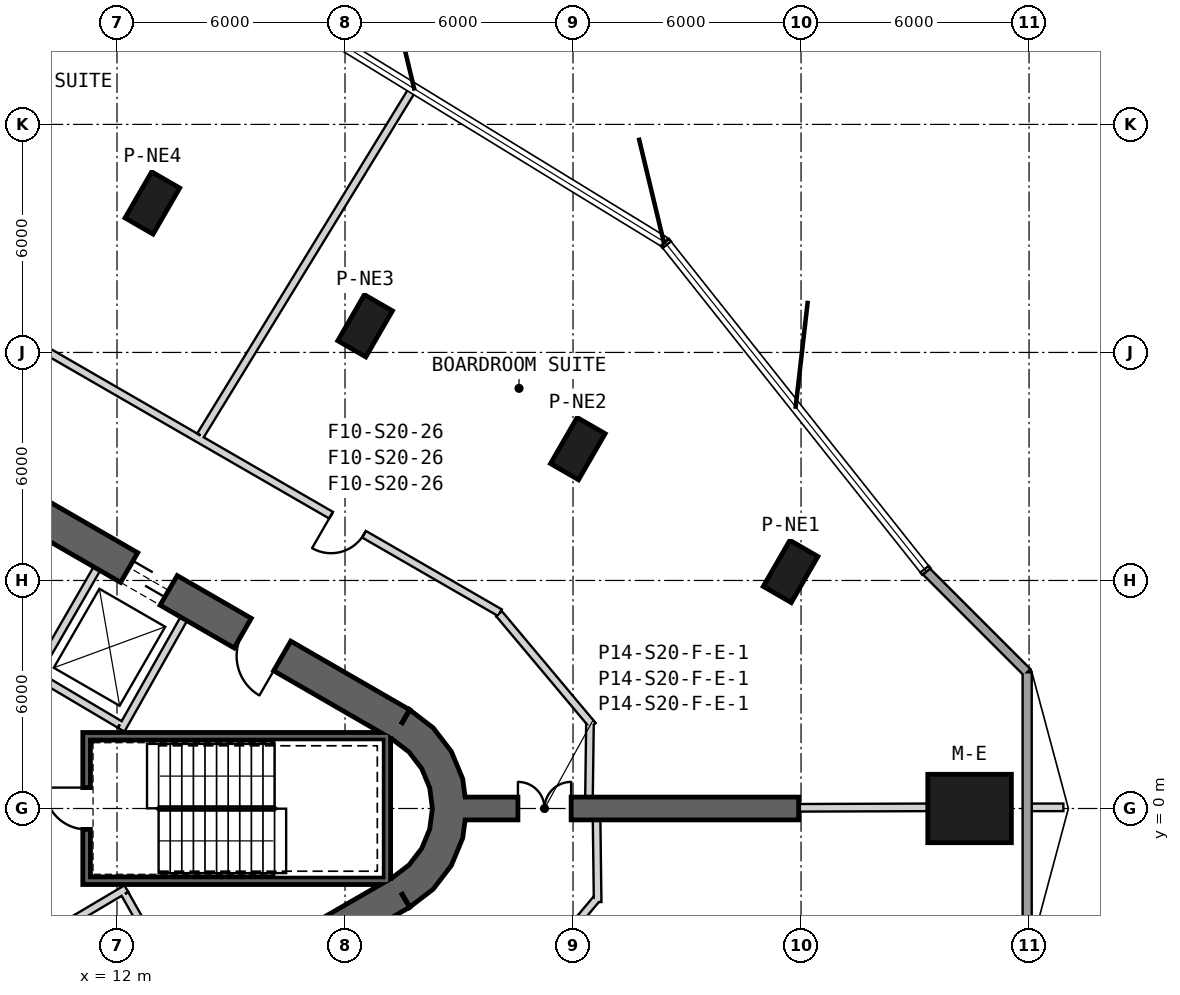
"""IFC4 building model, lengths in metres.
Left out: names, types, materials, properties, quantities, classifications, styles, units other than length and angle.
Written with IfcOpenShell. Run it as: python <this file> out.ifc"""

import sys

from ifc_helpers import new_model, si_unit, direction, frame, frame_2d, origin, origin_2d, place, context, subcontext, project, spatial, polyline, rectangle, outline, extrude, element, fill, save


model = new_model("IFC4")
c1 = context("Model", 3, precision=1e-05, world=origin(), true_north=direction((0.0, 1.0)))
c2 = subcontext(c1, "Body", "Model", "MODEL_VIEW")
j1 = project(units=[si_unit("LENGTHUNIT", "METRE"), si_unit("PLANEANGLEUNIT", "RADIAN")], contexts=[c1])
p1 = place(None, origin())
s1 = spatial("IfcSite", under=j1, at=p1, CompositionType="ELEMENT")
p2 = place(p1, origin())
s2 = spatial("IfcBuilding", under=s1, at=p2, CompositionType="ELEMENT")
p3 = place(p2, frame((0.0, 0.0, 322.1)))
s3 = spatial("IfcBuildingStorey", under=s2, at=p3, CompositionType="ELEMENT", Elevation=322.1)
p4 = place(p3, frame((34.435, 0.0, 0.0), z_axis=(0.0, 0.0, 1.0), x_axis=(1.0, 0.0, 0.0)))
e1 = element("IfcColumn", 1, at=p4, inside=s3, PredefinedType="COLUMN", context=c2, shape_type="SweptSolid", body=[
    extrude(rectangle(XDim=2.2, YDim=1.8, at=origin_2d()), origin(), (0.0, 0.0, 1.0), 3.9),
])
for number, where, z_axis, x_axis in (
    (2, (29.725, 6.237, 0.0), (0.0, 0.0, 1.0), (0.5, 0.866, 0.0)),
    (3, (24.127, 9.469, 0.0), (0.0, 0.0, 1.0), (0.5, 0.866, 0.0)),
    (4, (18.529, 12.701, 0.0), (0.0, 0.0, 1.0), (0.5, 0.866, 0.0)),
    (5, (12.931, 15.933, 0.0), (0.0, 0.0, 1.0), (0.5, 0.866, 0.0)),
):
    element("IfcColumn", number, at=place(p3, frame(where, z_axis=z_axis, x_axis=x_axis)), inside=s3, PredefinedType="COLUMN", context=c2, shape_type="SweptSolid", body=[
        extrude(rectangle(XDim=1.4, YDim=0.85, at=origin_2d()), origin(), (0.0, 0.0, 1.0), 3.9),
    ])
p5 = place(p3, frame((19.475, 2.208, 0.0), z_axis=(0.0, 0.0, 1.0), x_axis=(-0.866028369851, 0.499994862586, 0.0)))
e6 = element("IfcWall", 6, at=p5, inside=s3, PredefinedType="SHEAR", context=c2, shape_type="SweptSolid", body=[
    extrude(rectangle(XDim=31.523, YDim=0.9, at=frame_2d((15.762, 0.0))), origin(), (0.0, 0.0, 1.0), 3.9),
])
p6 = place(p5, frame((7.062, 0.0, 0.0)))
e7 = element("IfcOpeningElement", 7, at=p6, cuts=e6, PredefinedType="OPENING", context=c2, shape_type="SweptSolid", body=[
    extrude(rectangle(XDim=1.2, YDim=2.4, at=frame_2d((0.6, 1.2))), frame((0.0, 0.46, 0.0), z_axis=(0.0, -1.0, 0.0), x_axis=(1.0, 0.0, 0.0)), (0.0, 0.0, 1.0), 0.92),
])
p7 = place(p5, frame((3.612, 0.0, 0.0)))
e8 = element("IfcOpeningElement", 8, at=p7, cuts=e6, PredefinedType="OPENING", context=c2, shape_type="SweptSolid", body=[
    extrude(rectangle(XDim=1.2, YDim=2.4, at=frame_2d((0.6, 1.2))), frame((0.0, 0.46, 0.0), z_axis=(0.0, -1.0, 0.0), x_axis=(1.0, 0.0, 0.0)), (0.0, 0.0, 1.0), 0.92),
])
p8 = place(p5, frame((26.712, 0.0, 0.0)))
e9 = element("IfcOpeningElement", 9, at=p8, cuts=e6, PredefinedType="OPENING", context=c2, shape_type="SweptSolid", body=[
    extrude(rectangle(XDim=1.2, YDim=2.4, at=frame_2d((0.6, 1.2))), frame((0.0, 0.46, 0.0), z_axis=(0.0, -1.0, 0.0), x_axis=(1.0, 0.0, 0.0)), (0.0, 0.0, 1.0), 0.92),
])
p9 = place(p3, frame((-7.825, -17.97, 0.0), z_axis=(0.0, 0.0, 1.0), x_axis=(0.866028369851, 0.499994862586, 0.0)))
e10 = element("IfcWall", 10, at=p9, inside=s3, PredefinedType="SHEAR", context=c2, shape_type="SweptSolid", body=[
    extrude(rectangle(XDim=31.523, YDim=0.9, at=frame_2d((15.762, 0.0))), origin(), (0.0, 0.0, 1.0), 3.9),
])
p10 = place(p9, frame((17.862, 0.0, 0.0)))
e11 = element("IfcOpeningElement", 11, at=p10, cuts=e10, PredefinedType="OPENING", context=c2, shape_type="SweptSolid", body=[
    extrude(rectangle(XDim=1.2, YDim=2.4, at=frame_2d((0.6, 1.2))), frame((0.0, 0.46, 0.0), z_axis=(0.0, -1.0, 0.0), x_axis=(1.0, 0.0, 0.0)), (0.0, 0.0, 1.0), 0.92),
])
p11 = place(p9, frame((20.562, 0.0, 0.0)))
e12 = element("IfcOpeningElement", 12, at=p11, cuts=e10, PredefinedType="OPENING", context=c2, shape_type="SweptSolid", body=[
    extrude(rectangle(XDim=1.2, YDim=2.4, at=frame_2d((0.6, 1.2))), frame((0.0, 0.46, 0.0), z_axis=(0.0, -1.0, 0.0), x_axis=(1.0, 0.0, 0.0)), (0.0, 0.0, 1.0), 0.92),
])
p12 = place(p9, frame((26.712, 0.0, 0.0)))
e13 = element("IfcOpeningElement", 13, at=p12, cuts=e10, PredefinedType="OPENING", context=c2, shape_type="SweptSolid", body=[
    extrude(rectangle(XDim=1.2, YDim=2.4, at=frame_2d((0.6, 1.2))), frame((0.0, 0.46, 0.0), z_axis=(0.0, -1.0, 0.0), x_axis=(1.0, 0.0, 0.0)), (0.0, 0.0, 1.0), 0.92),
])
p13 = place(p9, frame((3.612, 0.0, 0.0)))
e14 = element("IfcOpeningElement", 14, at=p13, cuts=e10, PredefinedType="OPENING", context=c2, shape_type="SweptSolid", body=[
    extrude(rectangle(XDim=1.2, YDim=2.4, at=frame_2d((0.6, 1.2))), frame((0.0, 0.46, 0.0), z_axis=(0.0, -1.0, 0.0), x_axis=(1.0, 0.0, 0.0)), (0.0, 0.0, 1.0), 0.92),
])
p14 = place(p3, origin())
e15 = element("IfcWall", 15, at=p14, inside=s3, PredefinedType="SHEAR", context=c2, shape_type="SweptSolid", body=[
    extrude(outline(polyline([(19.7, -2.598), (20.321, -2.121), (20.798, -1.5), (21.098, -0.777), (21.2, 0.0), (21.098, 0.777), (20.798, 1.5), (20.321, 2.121), (19.7, 2.598), (19.25, 1.819), (19.685, 1.485), (20.019, 1.05), (20.229, 0.543), (20.3, 0.0), (20.229, -0.543), (20.019, -1.05), (19.685, -1.485), (19.25, -1.819), (19.7, -2.598)])), origin(), (0.0, 0.0, 1.0), 3.9),
])
p15 = place(p3, frame((21.15, 0.0, 0.0), z_axis=(0.0, 0.0, 1.0), x_axis=(1.0, 0.0, 0.0)))
e16 = element("IfcWall", 16, at=p15, inside=s3, PredefinedType="SHEAR", context=c2, shape_type="SweptSolid", body=[
    extrude(rectangle(XDim=8.787, YDim=0.6, at=frame_2d((4.394, 0.0))), origin(), (0.0, 0.0, 1.0), 3.9),
])
p16 = place(p15, frame((1.4, 0.0, 0.0)))
e17 = element("IfcOpeningElement", 17, at=p16, cuts=e16, PredefinedType="OPENING", context=c2, shape_type="SweptSolid", body=[
    extrude(rectangle(XDim=1.4, YDim=2.4, at=frame_2d((0.7, 1.2))), frame((0.0, 0.31, 0.0), z_axis=(0.0, -1.0, 0.0), x_axis=(1.0, 0.0, 0.0)), (0.0, 0.0, 1.0), 0.62),
])
p17 = place(p3, frame((35.95, -3.584, 0.0), z_axis=(0.0, 0.0, 1.0), x_axis=(0.0, 1.0, 0.0)))
e18 = element("IfcWall", 18, at=p17, inside=s3, PredefinedType="SOLIDWALL", context=c2, shape_type="SweptSolid", body=[
    extrude(rectangle(XDim=7.168, YDim=0.24, at=frame_2d((3.584, 0.0))), origin(), (0.0, 0.0, 1.0), 3.6),
])
p18 = place(p3, frame((35.95, 3.584, 0.0), z_axis=(0.0, 0.0, 1.0), x_axis=(-0.707074223377, 0.707139337497, 0.0)))
e19 = element("IfcWall", 19, at=p18, inside=s3, PredefinedType="SOLIDWALL", context=c2, shape_type="SweptSolid", body=[
    extrude(rectangle(XDim=3.75, YDim=0.24, at=frame_2d((1.875, 0.0))), origin(), (0.0, 0.0, 1.0), 3.6),
])
p19 = place(p3, frame((9.847, 3.495, 0.0), z_axis=(0.0, 0.0, 1.0), x_axis=(0.499984717929, 0.866034226713, 0.0)))
e20 = element("IfcWall", 20, at=p19, inside=s3, PredefinedType="PLUMBINGWALL", context=c2, shape_type="SweptSolid", body=[
    extrude(rectangle(XDim=3.25, YDim=0.2, at=frame_2d((1.625, 0.0))), origin(), (0.0, 0.0, 1.0), 3.6),
])
p20 = place(p3, frame((12.11, 2.073, 0.0), z_axis=(0.0, 0.0, 1.0), x_axis=(0.49196600604, 0.870614408852, 0.0)))
e21 = element("IfcWall", 21, at=p20, inside=s3, PredefinedType="PLUMBINGWALL", context=c2, shape_type="SweptSolid", body=[
    extrude(rectangle(XDim=3.35, YDim=0.2, at=frame_2d((1.675, 0.0))), origin(), (0.0, 0.0, 1.0), 3.6),
])
p21 = place(p3, frame((12.073, 2.211, 0.0), z_axis=(0.0, 0.0, 1.0), x_axis=(-0.860414880418, 0.509594185166, 0.0)))
e22 = element("IfcWall", 22, at=p21, inside=s3, PredefinedType="PLUMBINGWALL", context=c2, shape_type="SweptSolid", body=[
    extrude(rectangle(XDim=2.7, YDim=0.2, at=frame_2d((1.35, 0.0))), origin(), (0.0, 0.0, 1.0), 3.6),
])
p22 = place(p3, frame((19.2, 1.9, -0.3), z_axis=(0.0, 0.0, 1.0), x_axis=(-1.0, 0.0, 0.0)))
e23 = element("IfcWall", 23, at=p22, inside=s3, PredefinedType="SHEAR", context=c2, shape_type="SweptSolid", body=[
    extrude(rectangle(XDim=8.1, YDim=0.2, at=frame_2d((4.05, 0.0))), origin(), (0.0, 0.0, 1.0), 3.9),
])
p23 = place(p3, frame((19.1, -2.0, -0.3), z_axis=(0.0, 0.0, 1.0), x_axis=(0.0, 1.0, 0.0)))
e24 = element("IfcWall", 24, at=p23, inside=s3, PredefinedType="SHEAR", context=c2, shape_type="SweptSolid", body=[
    extrude(rectangle(XDim=3.8, YDim=0.2, at=frame_2d((1.9, 0.0))), origin(), (0.0, 0.0, 1.0), 3.9),
])
p24 = place(p3, frame((11.1, -1.9, -0.3), z_axis=(0.0, 0.0, 1.0), x_axis=(1.0, 0.0, 0.0)))
e25 = element("IfcWall", 25, at=p24, inside=s3, PredefinedType="SHEAR", context=c2, shape_type="SweptSolid", body=[
    extrude(rectangle(XDim=7.9, YDim=0.2, at=frame_2d((3.95, 0.0))), origin(), (0.0, 0.0, 1.0), 3.9),
])
p25 = place(p3, frame((11.2, -1.8, -0.3), z_axis=(0.0, 0.0, 1.0), x_axis=(0.0, 1.0, 0.0)))
e26 = element("IfcWall", 26, at=p25, inside=s3, PredefinedType="SHEAR", context=c2, shape_type="SweptSolid", body=[
    extrude(rectangle(XDim=3.6, YDim=0.2, at=frame_2d((1.8, 0.0))), origin(), (0.0, 0.0, 1.0), 3.9),
])
p26 = place(p25, frame((1.25, 0.0, 0.3)))
e27 = element("IfcOpeningElement", 27, at=p26, cuts=e26, PredefinedType="OPENING", context=c2, shape_type="SweptSolid", body=[
    extrude(rectangle(XDim=1.1, YDim=2.1, at=frame_2d((0.55, 1.05))), frame((0.0, 0.11, 0.0), z_axis=(0.0, -1.0, 0.0), x_axis=(1.0, 0.0, 0.0)), (0.0, 0.0, 1.0), 0.22),
])
p27 = place(p3, frame((12.245, -2.109, 0.0), z_axis=(0.0, 0.0, 1.0), x_axis=(-0.860414880418, -0.509594185166, 0.0)))
e28 = element("IfcWall", 28, at=p27, inside=s3, PredefinedType="PARTITIONING", context=c2, shape_type="SweptSolid", body=[
    extrude(rectangle(XDim=2.7, YDim=0.2, at=frame_2d((1.35, 0.0))), origin(), (0.0, 0.0, 1.0), 3.6),
])
p28 = place(p3, frame((13.758, -4.99, 0.0), z_axis=(0.0, 0.0, 1.0), x_axis=(-0.491993409184, 0.87059892334, 0.0)))
e29 = element("IfcWall", 29, at=p28, inside=s3, PredefinedType="PARTITIONING", context=c2, shape_type="SweptSolid", body=[
    extrude(rectangle(XDim=3.15, YDim=0.2, at=frame_2d((1.575, 0.0))), origin(), (0.0, 0.0, 1.0), 3.6),
])
p29 = place(p28, frame((1.175, 0.0, 0.0)))
e30 = element("IfcOpeningElement", 30, at=p29, cuts=e29, PredefinedType="OPENING", context=c2, shape_type="SweptSolid", body=[
    extrude(rectangle(XDim=0.8, YDim=2.1, at=frame_2d((0.4, 1.05))), frame((0.0, 0.11, 0.0), z_axis=(0.0, -1.0, 0.0), x_axis=(1.0, 0.0, 0.0)), (0.0, 0.0, 1.0), 0.22),
])
p30 = place(p3, frame((22.074, 5.153, 0.0), z_axis=(0.0, 0.0, 1.0), x_axis=(-0.866023485483, 0.500003322581, 0.0)))
e31 = element("IfcWall", 31, at=p30, inside=s3, PredefinedType="PARTITIONING", context=c2, shape_type="SweptSolid", body=[
    extrude(rectangle(XDim=32.881, YDim=0.2, at=frame_2d((16.44, 0.0))), origin(), (0.0, 0.0, 1.0), 2.97),
])
p31 = place(p30, frame((28.249, 0.0, 0.0)))
e32 = element("IfcOpeningElement", 32, at=p31, cuts=e31, PredefinedType="OPENING", context=c2, shape_type="SweptSolid", body=[
    extrude(rectangle(XDim=1.0, YDim=2.1, at=frame_2d((0.5, 1.05))), frame((0.0, 0.11, 0.0), z_axis=(0.0, -1.0, 0.0), x_axis=(1.0, 0.0, 0.0)), (0.0, 0.0, 1.0), 0.22),
])
p32 = place(p30, frame((16.387, 0.0, 0.0)))
e33 = element("IfcOpeningElement", 33, at=p32, cuts=e31, PredefinedType="OPENING", context=c2, shape_type="SweptSolid", body=[
    extrude(rectangle(XDim=1.0, YDim=2.1, at=frame_2d((0.5, 1.05))), frame((0.0, 0.11, 0.0), z_axis=(0.0, -1.0, 0.0), x_axis=(1.0, 0.0, 0.0)), (0.0, 0.0, 1.0), 0.22),
])
p33 = place(p30, frame((4.128, 0.0, 0.0)))
e34 = element("IfcOpeningElement", 34, at=p33, cuts=e31, PredefinedType="OPENING", context=c2, shape_type="SweptSolid", body=[
    extrude(rectangle(XDim=1.0, YDim=2.1, at=frame_2d((0.5, 1.05))), frame((0.0, 0.11, 0.0), z_axis=(0.0, -1.0, 0.0), x_axis=(1.0, 0.0, 0.0)), (0.0, 0.0, 1.0), 0.22),
])
p34 = place(p3, frame((24.521, 2.185, 0.0), z_axis=(0.0, 0.0, 1.0), x_axis=(-0.642781993054, 0.766049155998, 0.0)))
e35 = element("IfcWall", 35, at=p34, inside=s3, PredefinedType="PARTITIONING", context=c2, shape_type="SweptSolid", body=[
    extrude(rectangle(XDim=3.84, YDim=0.2, at=frame_2d((1.92, 0.0))), origin(), (0.0, 0.0, 1.0), 2.88),
])
p35 = place(p3, frame((24.42, 0.3, 0.0), z_axis=(0.0, 0.0, 1.0), x_axis=(0.013193472226, 0.999912962358, 0.0)))
e36 = element("IfcWall", 36, at=p35, inside=s3, PredefinedType="PARTITIONING", context=c2, shape_type="SweptSolid", body=[
    extrude(rectangle(XDim=1.925, YDim=0.2, at=frame_2d((0.962, 0.0))), origin(), (0.0, 0.0, 1.0), 3.6),
])
p36 = place(p3, frame((24.648, -2.462, 0.0), z_axis=(0.0, 0.0, 1.0), x_axis=(-0.012757232068, 0.999918623204, 0.0)))
e37 = element("IfcWall", 37, at=p36, inside=s3, PredefinedType="PARTITIONING", context=c2, shape_type="SweptSolid", body=[
    extrude(rectangle(XDim=2.163, YDim=0.2, at=frame_2d((1.081, 0.0))), origin(), (0.0, 0.0, 1.0), 3.6),
])
p37 = place(p3, frame((22.054, -5.435, 0.0), z_axis=(0.0, 0.0, 1.0), x_axis=(0.642790979996, 0.766041615081, 0.0)))
e38 = element("IfcWall", 38, at=p37, inside=s3, PredefinedType="PARTITIONING", context=c2, shape_type="SweptSolid", body=[
    extrude(rectangle(XDim=3.983, YDim=0.2, at=frame_2d((1.992, 0.0))), origin(), (0.0, 0.0, 1.0), 2.88),
])
p38 = place(p3, frame((19.795, 18.955, 0.0), z_axis=(0.0, 0.0, 1.0), x_axis=(-0.522384145162, -0.852710270187, 0.0)))
e39 = element("IfcWall", 39, at=p38, inside=s3, PredefinedType="PARTITIONING", context=c2, shape_type="SweptSolid", body=[
    extrude(rectangle(XDim=10.716, YDim=0.2, at=frame_2d((5.358, 0.0))), origin(), (0.0, 0.0, 1.0), 2.97),
])
p39 = place(p3, frame((33.335, 0.03, 0.0), z_axis=(0.0, 0.0, 1.0), x_axis=(-0.999994052186, -0.003448998671, 0.0)))
e40 = element("IfcWall", 40, at=p39, inside=s3, PredefinedType="PARTITIONING", context=c2, shape_type="SweptSolid", body=[
    extrude(rectangle(XDim=3.398, YDim=0.2, at=frame_2d((1.699, 0.0))), origin(), (0.0, 0.0, 1.0), 3.17),
])
p40 = place(p3, frame((36.903, 0.03, 0.0), z_axis=(0.0, 0.0, 1.0), x_axis=(-1.0, 0.0, 0.0)))
e41 = element("IfcWall", 41, at=p40, inside=s3, PredefinedType="PARTITIONING", context=c2, shape_type="SweptSolid", body=[
    extrude(rectangle(XDim=0.832, YDim=0.2, at=frame_2d((0.416, 0.0))), origin(), (0.0, 0.0, 1.0), 3.6),
])
p41 = place(p26, origin())
e42 = element("IfcDoor", 42, at=p41, inside=s3, OperationType="SINGLE_SWING_LEFT", PredefinedType="USERDEFINED", context=c2, shape_type="SweptSolid", body=[
    extrude(rectangle(XDim=1.1, YDim=2.1, at=frame_2d((0.55, 1.05))), frame((0.0, 0.025, 0.0), z_axis=(0.0, -1.0, 0.0), x_axis=(1.0, 0.0, 0.0)), (0.0, 0.0, 1.0), 0.05),
])
fill(e27, e42)
p42 = place(p33, origin())
e43 = element("IfcDoor", 43, at=p42, inside=s3, OperationType="SINGLE_SWING_RIGHT", PredefinedType="USERDEFINED", context=c2, shape_type="SweptSolid", body=[
    extrude(rectangle(XDim=1.0, YDim=2.1, at=frame_2d((0.5, 1.05))), frame((0.0, 0.025, 0.0), z_axis=(0.0, -1.0, 0.0), x_axis=(1.0, 0.0, 0.0)), (0.0, 0.0, 1.0), 0.05),
])
fill(e34, e43)
p43 = place(p6, origin())
e44 = element("IfcDoor", 44, at=p43, inside=s3, OperationType="SLIDING_TO_LEFT", PredefinedType="USERDEFINED", context=c2, shape_type="SweptSolid", body=[
    extrude(rectangle(XDim=1.2, YDim=2.4, at=frame_2d((0.6, 1.2))), frame((0.0, 0.025, 0.0), z_axis=(0.0, -1.0, 0.0), x_axis=(1.0, 0.0, 0.0)), (0.0, 0.0, 1.0), 0.05),
])
fill(e7, e44)
p44 = place(p7, origin())
e45 = element("IfcDoor", 45, at=p44, inside=s3, OperationType="SINGLE_SWING_LEFT", PredefinedType="USERDEFINED", context=c2, shape_type="SweptSolid", body=[
    extrude(rectangle(XDim=1.2, YDim=2.4, at=frame_2d((0.6, 1.2))), frame((0.0, 0.025, 0.0), z_axis=(0.0, -1.0, 0.0), x_axis=(1.0, 0.0, 0.0)), (0.0, 0.0, 1.0), 0.05),
])
fill(e8, e45)
p45 = place(p16, origin())
e46 = element("IfcDoor", 46, at=p45, inside=s3, OperationType="DOUBLE_DOOR_SINGLE_SWING", PredefinedType="NOTDEFINED", context=c2, shape_type="SweptSolid", body=[
    extrude(rectangle(XDim=1.4, YDim=2.4, at=frame_2d((0.7, 1.2))), frame((0.0, 0.025, 0.0), z_axis=(0.0, -1.0, 0.0), x_axis=(1.0, 0.0, 0.0)), (0.0, 0.0, 1.0), 0.05),
])
fill(e17, e46)
save(model, sys.argv[1])
